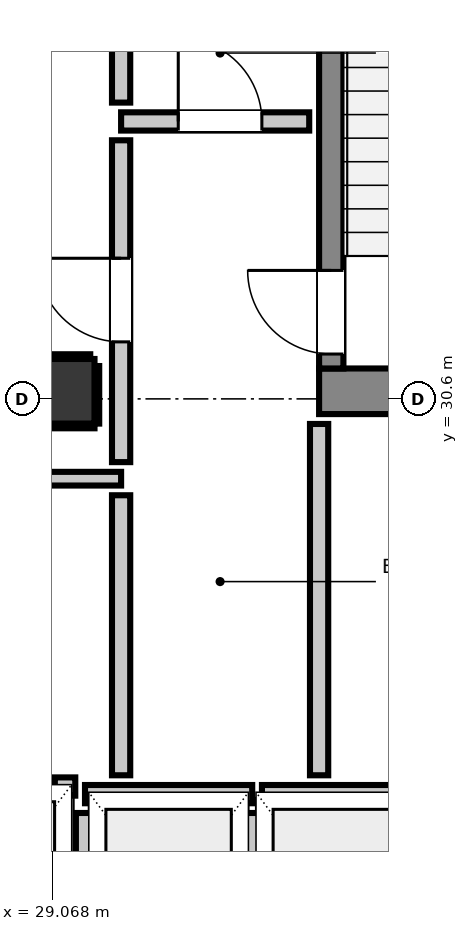
"""IFC4 building model, lengths in metres.
Left out: names, types, materials, properties, quantities, classifications, styles, units other than length and angle.
Written with IfcOpenShell. Run it as: python <this file> out.ifc"""

import sys

from ifc_helpers import new_model, si_unit, direction, frame, frame_2d, origin, origin_2d, place, context, subcontext, project, spatial, rectangle, extrude, element, fill, save


model = new_model("IFC4")
c1 = context("Model", 3, precision=1e-05, world=origin(), true_north=direction((0.0, 1.0)))
c2 = subcontext(c1, "Body", "Model", "MODEL_VIEW")
j1 = project(units=[si_unit("LENGTHUNIT", "METRE"), si_unit("PLANEANGLEUNIT", "RADIAN")], contexts=[c1])
p1 = place(None, origin())
s1 = spatial("IfcSite", under=j1, at=p1, CompositionType="ELEMENT")
p2 = place(p1, origin())
s2 = spatial("IfcBuilding", under=s1, at=p2, CompositionType="ELEMENT")
p3 = place(p2, frame((0.0, 0.0, 200.12)))
s3 = spatial("IfcBuildingStorey", under=s2, at=p3, CompositionType="ELEMENT", Elevation=200.12)
p4 = place(p3, frame((32.58, 30.7, 0.0), z_axis=(0.0, 0.0, 1.0), x_axis=(1.0, 0.0, 0.0)))
e1 = element("IfcWall", 1, at=p4, inside=s3, PredefinedType="SHEAR", context=c2, shape_type="SweptSolid", body=[
    extrude(rectangle(XDim=3.54, YDim=0.6, at=frame_2d((1.77, 0.0))), origin(), (0.0, 0.0, 1.0), 3.32),
])
p5 = place(p3, frame((32.74, 31.0, 0.0), z_axis=(0.0, 0.0, 1.0), x_axis=(0.0, 1.0, 0.0)))
e2 = element("IfcWall", 2, at=p5, inside=s3, PredefinedType="SHEAR", context=c2, shape_type="SweptSolid", body=[
    extrude(rectangle(XDim=7.8, YDim=0.32, at=frame_2d((3.9, 0.0))), origin(), (0.0, 0.0, 1.0), 3.32),
])
p6 = place(p5, frame((0.19, 0.0, 0.0)))
e3 = element("IfcOpeningElement", 3, at=p6, cuts=e2, PredefinedType="OPENING", context=c2, shape_type="SweptSolid", body=[
    extrude(rectangle(XDim=1.1, YDim=2.15, at=frame_2d((0.55, 1.075))), frame((0.0, 0.17, 0.0), z_axis=(0.0, -1.0, 0.0), x_axis=(1.0, 0.0, 0.0)), (0.0, 0.0, 1.0), 0.34),
])
p7 = place(p3, frame((29.2, 30.7, 0.0), z_axis=(0.0, 0.0, 1.0), x_axis=(1.0, 0.0, 0.0)))
e4 = element("IfcColumn", 4, at=p7, inside=s3, PredefinedType="COLUMN", context=c2, shape_type="SweptSolid", body=[
    extrude(rectangle(XDim=0.85, YDim=0.85, at=origin_2d()), origin(), (0.0, 0.0, 1.0), 3.32),
])
p8 = place(p3, frame((29.5, 25.4, 0.0), z_axis=(0.0, 0.0, 1.0), x_axis=(1.0, 0.0, 0.0)))
e5 = element("IfcWall", 5, at=p8, inside=s3, PredefinedType="PARTITIONING", context=c2, shape_type="SweptSolid", body=[
    extrude(rectangle(XDim=2.2, YDim=0.24, at=frame_2d((1.1, 0.0))), origin(), (0.0, 0.0, 1.0), 3.1),
])
p9 = place(p3, frame((29.5, 22.848, 0.0), z_axis=(0.0, 0.0, 1.0), x_axis=(0.0, 1.0, 0.0)))
e6 = element("IfcWall", 6, at=p9, inside=s3, PredefinedType="PARTITIONING", context=c2, shape_type="SweptSolid", body=[
    extrude(rectangle(XDim=2.304, YDim=0.24, at=frame_2d((1.152, 0.0))), origin(), (0.0, 0.0, 1.0), 2.335),
])
p10 = place(p3, frame((31.7, 22.848, 0.0), z_axis=(0.0, 0.0, 1.0), x_axis=(0.0, 1.0, 0.0)))
e7 = element("IfcWall", 7, at=p10, inside=s3, PredefinedType="PARTITIONING", context=c2, shape_type="SweptSolid", body=[
    extrude(rectangle(XDim=2.304, YDim=0.24, at=frame_2d((1.152, 0.0))), origin(), (0.0, 0.0, 1.0), 3.1),
])
p11 = place(p3, frame((31.828, 25.4, 0.0), z_axis=(0.0, 0.0, 1.0), x_axis=(1.0, 0.0, 0.0)))
e8 = element("IfcWall", 8, at=p11, inside=s3, PredefinedType="PARTITIONING", context=c2, shape_type="SweptSolid", body=[
    extrude(rectangle(XDim=2.072, YDim=0.24, at=frame_2d((1.036, 0.0))), origin(), (0.0, 0.0, 1.0), 3.1),
])
p12 = place(p3, frame((29.103, 25.5, 0.0), z_axis=(0.0, 0.0, 1.0), x_axis=(1.0, 0.0, 0.0)))
e9 = element("IfcWall", 9, at=p12, inside=s3, PredefinedType="PARTITIONING", context=c2, shape_type="SweptSolid", body=[
    extrude(rectangle(XDim=0.269, YDim=0.24, at=frame_2d((0.135, 0.0))), origin(), (0.0, 0.0, 1.0), 3.1),
])
p13 = place(p3, frame((29.975, 34.25, 0.0), z_axis=(0.0, 0.0, 1.0), x_axis=(1.0, 0.0, 0.0)))
e10 = element("IfcWall", 10, at=p13, inside=s3, PredefinedType="PARTITIONING", context=c2, shape_type="SweptSolid", body=[
    extrude(rectangle(XDim=2.475, YDim=0.24, at=frame_2d((1.237, 0.0))), origin(), (0.0, 0.0, 1.0), 3.1),
])
p14 = place(p13, frame((0.752, 0.0, 0.0)))
e11 = element("IfcOpeningElement", 11, at=p14, cuts=e10, PredefinedType="OPENING", context=c2, shape_type="SweptSolid", body=[
    extrude(rectangle(XDim=1.1, YDim=2.15, at=frame_2d((0.55, 1.075))), frame((0.0, 0.13, 0.0), z_axis=(0.0, -1.0, 0.0), x_axis=(1.0, 0.0, 0.0)), (0.0, 0.0, 1.0), 0.26),
])
p15 = place(p3, frame((28.593, 29.55, 0.0), z_axis=(0.0, 0.0, 1.0), x_axis=(1.0, 0.0, 0.0)))
e12 = element("IfcWall", 12, at=p15, inside=s3, PredefinedType="PARTITIONING", context=c2, shape_type="SweptSolid", body=[
    extrude(rectangle(XDim=1.382, YDim=0.18, at=frame_2d((0.691, 0.0))), origin(), (0.0, 0.0, 1.0), 3.1),
])
p16 = place(p3, frame((29.975, 25.648, 0.0), z_axis=(0.0, 0.0, 1.0), x_axis=(0.0, 1.0, 0.0)))
e13 = element("IfcWall", 13, at=p16, inside=s3, PredefinedType="PARTITIONING", context=c2, shape_type="SweptSolid", body=[
    extrude(rectangle(XDim=3.684, YDim=0.24, at=frame_2d((1.842, 0.0))), origin(), (0.0, 0.0, 1.0), 3.1),
])
p17 = place(p3, frame((29.975, 29.768, 0.0), z_axis=(0.0, 0.0, 1.0), x_axis=(0.0, 1.0, 0.0)))
e14 = element("IfcWall", 14, at=p17, inside=s3, PredefinedType="PARTITIONING", context=c2, shape_type="SweptSolid", body=[
    extrude(rectangle(XDim=4.234, YDim=0.24, at=frame_2d((2.117, 0.0))), origin(), (0.0, 0.0, 1.0), 3.1),
])
p18 = place(p17, frame((1.582, 0.0, 0.0)))
e15 = element("IfcOpeningElement", 15, at=p18, cuts=e14, PredefinedType="OPENING", context=c2, shape_type="SweptSolid", body=[
    extrude(rectangle(XDim=1.1, YDim=2.15, at=frame_2d((0.55, 1.075))), frame((0.0, 0.13, 0.0), z_axis=(0.0, -1.0, 0.0), x_axis=(1.0, 0.0, 0.0)), (0.0, 0.0, 1.0), 0.26),
])
p19 = place(p3, frame((29.975, 34.498, 0.0), z_axis=(0.0, 0.0, 1.0), x_axis=(0.0, 1.0, 0.0)))
e16 = element("IfcWall", 16, at=p19, inside=s3, PredefinedType="PARTITIONING", context=c2, shape_type="SweptSolid", body=[
    extrude(rectangle(XDim=0.934, YDim=0.24, at=frame_2d((0.467, 0.0))), origin(), (0.0, 0.0, 1.0), 3.1),
])
p20 = place(p3, frame((32.58, 25.648, 0.0), z_axis=(0.0, 0.0, 1.0), x_axis=(0.0, 1.0, 0.0)))
e17 = element("IfcWall", 17, at=p20, inside=s3, PredefinedType="PARTITIONING", context=c2, shape_type="SweptSolid", body=[
    extrude(rectangle(XDim=4.622, YDim=0.24, at=frame_2d((2.311, 0.0))), origin(), (0.0, 0.0, 1.0), 3.1),
])
p21 = place(p3, frame((28.775, 30.243, 0.0), z_axis=(0.0, 0.0, 1.0), x_axis=(1.0, 0.0, 0.0)))
e18 = element("IfcWall", 18, at=p21, inside=s3, PredefinedType="PARTITIONING", context=c2, shape_type="SweptSolid", body=[
    extrude(rectangle(XDim=0.85, YDim=0.06, at=frame_2d((0.425, 0.0))), origin(), (0.0, 0.0, 1.0), 1.45),
])
p22 = place(p3, frame((28.775, 31.157, 0.0), z_axis=(0.0, 0.0, 1.0), x_axis=(1.0, 0.0, 0.0)))
e19 = element("IfcWall", 19, at=p22, inside=s3, PredefinedType="PARTITIONING", context=c2, shape_type="SweptSolid", body=[
    extrude(rectangle(XDim=0.794, YDim=0.06, at=frame_2d((0.397, 0.0))), origin(), (0.0, 0.0, 1.0), 1.45),
])
p23 = place(p3, frame((29.657, 30.275, 0.0), z_axis=(0.0, 0.0, 1.0), x_axis=(0.0, 1.0, 0.0)))
e20 = element("IfcWall", 20, at=p23, inside=s3, PredefinedType="PARTITIONING", context=c2, shape_type="SweptSolid", body=[
    extrude(rectangle(XDim=0.757, YDim=0.06, at=frame_2d((0.378, 0.0))), origin(), (0.0, 0.0, 1.0), 1.45),
])
p24 = place(p6, origin())
e21 = element("IfcDoor", 21, at=p24, inside=s3, OperationType="SINGLE_SWING_RIGHT", PredefinedType="DOOR", context=c2, shape_type="SweptSolid", body=[
    extrude(rectangle(XDim=1.1, YDim=2.15, at=frame_2d((0.55, 1.075))), frame((0.0, 0.025, 0.0), z_axis=(0.0, -1.0, 0.0), x_axis=(1.0, 0.0, 0.0)), (0.0, 0.0, 1.0), 0.05),
])
fill(e3, e21)
p25 = place(p18, origin())
e22 = element("IfcDoor", 22, at=p25, inside=s3, OperationType="SINGLE_SWING_RIGHT", PredefinedType="DOOR", context=c2, shape_type="SweptSolid", body=[
    extrude(rectangle(XDim=1.1, YDim=2.15, at=frame_2d((0.55, 1.075))), frame((0.0, 0.025, 0.0), z_axis=(0.0, -1.0, 0.0), x_axis=(1.0, 0.0, 0.0)), (0.0, 0.0, 1.0), 0.05),
])
fill(e15, e22)
p26 = place(p14, origin())
e23 = element("IfcDoor", 23, at=p26, inside=s3, OperationType="SINGLE_SWING_LEFT", PredefinedType="DOOR", context=c2, shape_type="SweptSolid", body=[
    extrude(rectangle(XDim=1.1, YDim=2.15, at=frame_2d((0.55, 1.075))), frame((0.0, 0.025, 0.0), z_axis=(0.0, -1.0, 0.0), x_axis=(1.0, 0.0, 0.0)), (0.0, 0.0, 1.0), 0.05),
])
fill(e11, e23)
save(model, sys.argv[1])
